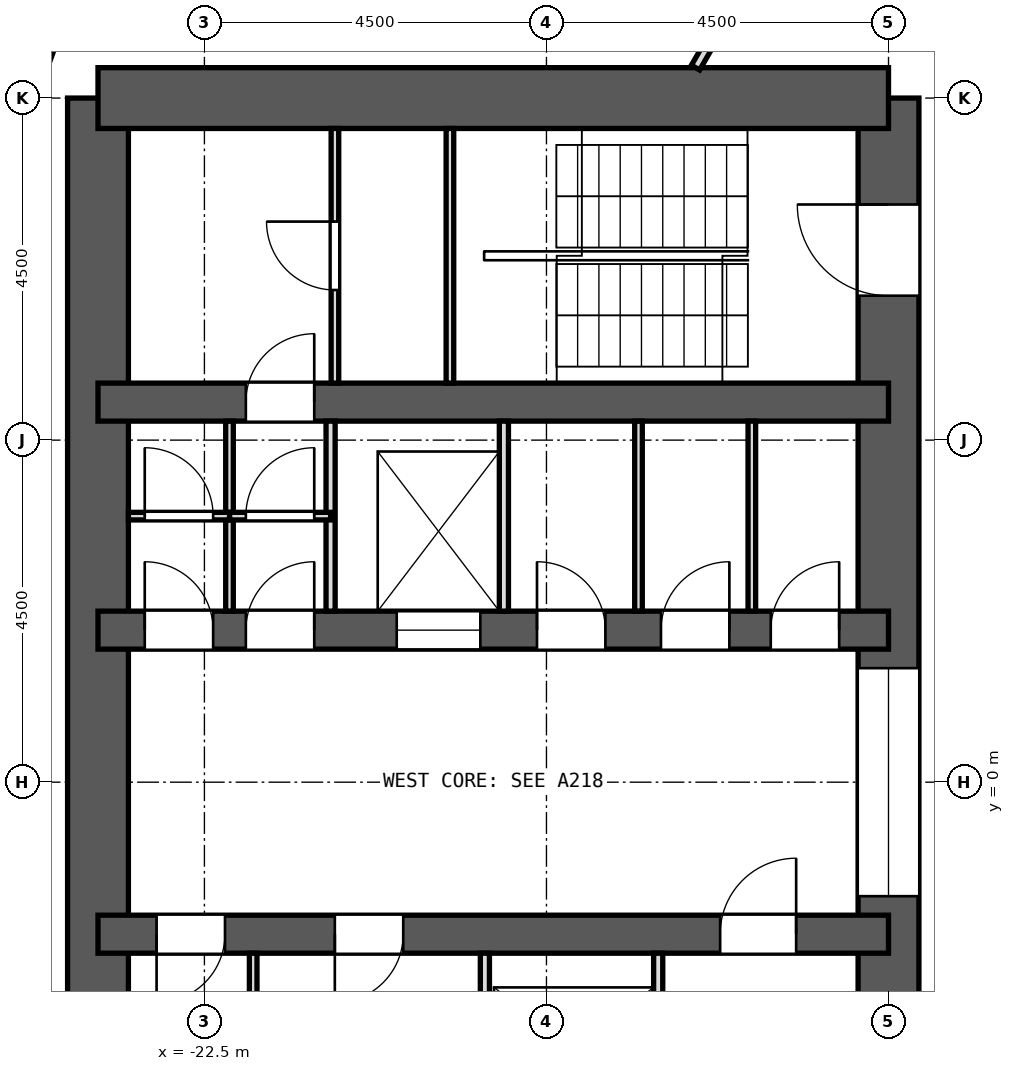
"""IFC4 building model, lengths in metres.
Left out: names, types, materials, properties, quantities, classifications, styles, units other than length and angle.
Written with IfcOpenShell. Run it as: python <this file> out.ifc"""

import sys

from ifc_helpers import new_model, si_unit, direction, frame, frame_2d, origin, place, context, subcontext, project, spatial, rectangle, extrude, element, fill, save


model = new_model("IFC4")
c1 = context("Model", 3, precision=1e-05, world=origin(), true_north=direction((0.0, 1.0)))
c2 = subcontext(c1, "Body", "Model", "MODEL_VIEW")
j1 = project(units=[si_unit("LENGTHUNIT", "METRE"), si_unit("PLANEANGLEUNIT", "RADIAN")], contexts=[c1])
p1 = place(None, origin())
s1 = spatial("IfcSite", under=j1, at=p1, CompositionType="ELEMENT")
p2 = place(p1, origin())
s2 = spatial("IfcBuilding", under=s1, at=p2, CompositionType="ELEMENT")
p3 = place(p2, frame((0.0, 0.0, 101.8)))
s3 = spatial("IfcBuildingStorey", under=s2, at=p3, CompositionType="ELEMENT", Elevation=101.8)
p4 = place(p3, frame((-13.5, -9.0, 0.0), z_axis=(0.0, 0.0, 1.0), x_axis=(0.0, 1.0, 0.0)))
e1 = element("IfcWall", 1, at=p4, inside=s3, PredefinedType="SHEAR", context=c2, shape_type="SweptSolid", body=[
    extrude(rectangle(XDim=18.0, YDim=0.8, at=frame_2d((9.0, 0.0))), origin(), (0.0, 0.0, 1.0), 3.3),
])
p5 = place(p4, frame((15.4, 0.0, 0.0)))
e2 = element("IfcOpeningElement", 2, at=p5, cuts=e1, PredefinedType="OPENING", context=c2, shape_type="SweptSolid", body=[
    extrude(rectangle(XDim=1.2, YDim=2.1, at=frame_2d((0.6, 1.05))), frame((0.0, 0.412, 0.0), z_axis=(0.0, -1.0, 0.0), x_axis=(1.0, 0.0, 0.0)), (0.0, 0.0, 1.0), 0.824),
])
p6 = place(p4, frame((1.4, 0.0, 0.0)))
e3 = element("IfcOpeningElement", 3, at=p6, cuts=e1, PredefinedType="OPENING", context=c2, shape_type="SweptSolid", body=[
    extrude(rectangle(XDim=1.2, YDim=2.1, at=frame_2d((0.6, 1.05))), frame((0.0, 0.412, 0.0), z_axis=(0.0, -1.0, 0.0), x_axis=(1.0, 0.0, 0.0)), (0.0, 0.0, 1.0), 0.824),
])
p7 = place(p4, frame((7.5, 0.0, 0.0)))
e4 = element("IfcOpeningElement", 4, at=p7, cuts=e1, PredefinedType="OPENING", context=c2, shape_type="SweptSolid", body=[
    extrude(rectangle(XDim=3.0, YDim=2.4, at=frame_2d((1.5, 1.2))), frame((0.0, 0.412, 0.0), z_axis=(0.0, -1.0, 0.0), x_axis=(1.0, 0.0, 0.0)), (0.0, 0.0, 1.0), 0.824),
])
p8 = place(p3, frame((-23.9, -9.0, 0.0), z_axis=(0.0, 0.0, 1.0), x_axis=(0.0, 1.0, 0.0)))
e5 = element("IfcWall", 5, at=p8, inside=s3, PredefinedType="SHEAR", context=c2, shape_type="SweptSolid", body=[
    extrude(rectangle(XDim=18.0, YDim=0.8, at=frame_2d((9.0, 0.0))), origin(), (0.0, 0.0, 1.0), 3.3),
])
p9 = place(p3, frame((-13.5, 9.0, 0.0), z_axis=(0.0, 0.0, 1.0), x_axis=(-1.0, 0.0, 0.0)))
e6 = element("IfcWall", 6, at=p9, inside=s3, PredefinedType="SHEAR", context=c2, shape_type="SweptSolid", body=[
    extrude(rectangle(XDim=10.4, YDim=0.8, at=frame_2d((5.2, 0.0))), origin(), (0.0, 0.0, 1.0), 3.3),
])
p10 = place(p3, frame((-13.5, 5.0, 0.0), z_axis=(0.0, 0.0, 1.0), x_axis=(-1.0, 0.0, 0.0)))
e7 = element("IfcWall", 7, at=p10, inside=s3, PredefinedType="SHEAR", context=c2, shape_type="SweptSolid", body=[
    extrude(rectangle(XDim=10.4, YDim=0.5, at=frame_2d((5.2, 0.0))), origin(), (0.0, 0.0, 1.0), 3.3),
])
p11 = place(p10, frame((7.555, 0.0, 0.0)))
e8 = element("IfcOpeningElement", 8, at=p11, cuts=e7, PredefinedType="OPENING", context=c2, shape_type="SweptSolid", body=[
    extrude(rectangle(XDim=0.9, YDim=2.1, at=frame_2d((0.45, 1.05))), frame((0.0, 0.262, 0.0), z_axis=(0.0, -1.0, 0.0), x_axis=(1.0, 0.0, 0.0)), (0.0, 0.0, 1.0), 0.524),
])
p12 = place(p3, frame((-13.5, 2.0, 0.0), z_axis=(0.0, 0.0, 1.0), x_axis=(-1.0, 0.0, 0.0)))
e9 = element("IfcWall", 9, at=p12, inside=s3, PredefinedType="SHEAR", context=c2, shape_type="SweptSolid", body=[
    extrude(rectangle(XDim=10.4, YDim=0.5, at=frame_2d((5.2, 0.0))), origin(), (0.0, 0.0, 1.0), 3.3),
])
p13 = place(p12, frame((5.37, 0.0, 0.0)))
e10 = element("IfcOpeningElement", 10, at=p13, cuts=e9, PredefinedType="OPENING", context=c2, shape_type="SweptSolid", body=[
    extrude(rectangle(XDim=1.1, YDim=2.1, at=frame_2d((0.55, 1.05))), frame((0.0, 0.262, 0.0), z_axis=(0.0, -1.0, 0.0), x_axis=(1.0, 0.0, 0.0)), (0.0, 0.0, 1.0), 0.524),
])
p14 = place(p12, frame((0.649, 0.0, 0.0)))
e11 = element("IfcOpeningElement", 11, at=p14, cuts=e9, PredefinedType="OPENING", context=c2, shape_type="SweptSolid", body=[
    extrude(rectangle(XDim=0.9, YDim=2.1, at=frame_2d((0.45, 1.05))), frame((0.0, 0.262, 0.0), z_axis=(0.0, -1.0, 0.0), x_axis=(1.0, 0.0, 0.0)), (0.0, 0.0, 1.0), 0.524),
])
p15 = place(p12, frame((2.094, 0.0, 0.0)))
e12 = element("IfcOpeningElement", 12, at=p15, cuts=e9, PredefinedType="OPENING", context=c2, shape_type="SweptSolid", body=[
    extrude(rectangle(XDim=0.9, YDim=2.1, at=frame_2d((0.45, 1.05))), frame((0.0, 0.262, 0.0), z_axis=(0.0, -1.0, 0.0), x_axis=(1.0, 0.0, 0.0)), (0.0, 0.0, 1.0), 0.524),
])
p16 = place(p12, frame((3.725, 0.0, 0.0)))
e13 = element("IfcOpeningElement", 13, at=p16, cuts=e9, PredefinedType="OPENING", context=c2, shape_type="SweptSolid", body=[
    extrude(rectangle(XDim=0.9, YDim=2.1, at=frame_2d((0.45, 1.05))), frame((0.0, 0.262, 0.0), z_axis=(0.0, -1.0, 0.0), x_axis=(1.0, 0.0, 0.0)), (0.0, 0.0, 1.0), 0.524),
])
p17 = place(p12, frame((7.555, 0.0, 0.0)))
e14 = element("IfcOpeningElement", 14, at=p17, cuts=e9, PredefinedType="OPENING", context=c2, shape_type="SweptSolid", body=[
    extrude(rectangle(XDim=0.9, YDim=2.1, at=frame_2d((0.45, 1.05))), frame((0.0, 0.262, 0.0), z_axis=(0.0, -1.0, 0.0), x_axis=(1.0, 0.0, 0.0)), (0.0, 0.0, 1.0), 0.524),
])
p18 = place(p12, frame((8.885, 0.0, 0.0)))
e15 = element("IfcOpeningElement", 15, at=p18, cuts=e9, PredefinedType="OPENING", context=c2, shape_type="SweptSolid", body=[
    extrude(rectangle(XDim=0.9, YDim=2.1, at=frame_2d((0.45, 1.05))), frame((0.0, 0.262, 0.0), z_axis=(0.0, -1.0, 0.0), x_axis=(1.0, 0.0, 0.0)), (0.0, 0.0, 1.0), 0.524),
])
p19 = place(p3, frame((-13.5, -2.0, 0.0), z_axis=(0.0, 0.0, 1.0), x_axis=(-1.0, 0.0, 0.0)))
e16 = element("IfcWall", 16, at=p19, inside=s3, PredefinedType="SHEAR", context=c2, shape_type="SweptSolid", body=[
    extrude(rectangle(XDim=10.4, YDim=0.5, at=frame_2d((5.2, 0.0))), origin(), (0.0, 0.0, 1.0), 3.3),
])
p20 = place(p19, frame((1.215, 0.0, 0.0)))
e17 = element("IfcOpeningElement", 17, at=p20, cuts=e16, PredefinedType="OPENING", context=c2, shape_type="SweptSolid", body=[
    extrude(rectangle(XDim=1.0, YDim=2.1, at=frame_2d((0.5, 1.05))), frame((0.0, 0.262, 0.0), z_axis=(0.0, -1.0, 0.0), x_axis=(1.0, 0.0, 0.0)), (0.0, 0.0, 1.0), 0.524),
])
p21 = place(p19, frame((6.384, 0.0, 0.0)))
e18 = element("IfcOpeningElement", 18, at=p21, cuts=e16, PredefinedType="OPENING", context=c2, shape_type="SweptSolid", body=[
    extrude(rectangle(XDim=0.9, YDim=2.1, at=frame_2d((0.45, 1.05))), frame((0.0, 0.262, 0.0), z_axis=(0.0, -1.0, 0.0), x_axis=(1.0, 0.0, 0.0)), (0.0, 0.0, 1.0), 0.524),
])
p22 = place(p19, frame((8.729, 0.0, 0.0)))
e19 = element("IfcOpeningElement", 19, at=p22, cuts=e16, PredefinedType="OPENING", context=c2, shape_type="SweptSolid", body=[
    extrude(rectangle(XDim=0.9, YDim=2.1, at=frame_2d((0.45, 1.05))), frame((0.0, 0.262, 0.0), z_axis=(0.0, -1.0, 0.0), x_axis=(1.0, 0.0, 0.0)), (0.0, 0.0, 1.0), 0.524),
])
p23 = place(p3, frame((-24.369, 10.811, 0.0), z_axis=(0.0, 0.0, 1.0), x_axis=(-0.341990236633, -0.939703505393, 0.0)))
e20 = element("IfcWall", 20, at=p23, inside=s3, PredefinedType="SOLIDWALL", context=c2, shape_type="SweptSolid", body=[
    extrude(rectangle(XDim=3.648, YDim=0.6, at=frame_2d((1.824, 0.0))), origin(), (0.0, 0.0, 1.0), 2.8),
])
p24 = place(p3, frame((-13.101, 13.099, 0.0), z_axis=(0.0, 0.0, 1.0), x_axis=(0.707106781187, -0.707106781187, 0.0)))
e21 = element("IfcWall", 21, at=p24, inside=s3, PredefinedType="PARTITIONING", context=c2, shape_type="SweptSolid", body=[
    extrude(rectangle(XDim=5.203, YDim=0.125, at=frame_2d((2.602, 0.0))), origin(), (0.0, 0.0, 1.0), 2.8),
])
p25 = place(p3, frame((-16.039, 9.401, 0.0), z_axis=(0.0, 0.0, 1.0), x_axis=(0.499950205064, 0.866054150996, 0.0)))
e22 = element("IfcWall", 22, at=p25, inside=s3, PredefinedType="PARTITIONING", context=c2, shape_type="SweptSolid", body=[
    extrude(rectangle(XDim=1.454, YDim=0.125, at=frame_2d((0.727, 0.0))), origin(), (0.0, 0.0, 1.0), 2.8),
])
for number, where, z_axis, x_axis in (
    (23, (-15.298, 2.25, 0.0), (0.0, 0.0, 1.0), (0.0, 1.0, 0.0)),
    (24, (-16.789, 2.25, 0.0), (0.0, 0.0, 1.0), (0.0, 1.0, 0.0)),
):
    element("IfcWall", number, at=place(p3, frame(where, z_axis=z_axis, x_axis=x_axis)), inside=s3, PredefinedType="PARTITIONING", context=c2, shape_type="SweptSolid", body=[
        extrude(rectangle(XDim=2.5, YDim=0.1, at=frame_2d((1.25, 0.0))), origin(), (0.0, 0.0, 1.0), 2.8),
    ])
for number, where, z_axis, x_axis in (
    (25, (-18.56, 2.25, 0.0), (0.0, 0.0, 1.0), (0.0, 1.0, 0.0)),
    (26, (-20.84, 2.25, 0.0), (0.0, 0.0, 1.0), (0.0, 1.0, 0.0)),
):
    element("IfcWall", number, at=place(p3, frame(where, z_axis=z_axis, x_axis=x_axis)), inside=s3, PredefinedType="PARTITIONING", context=c2, shape_type="SweptSolid", body=[
        extrude(rectangle(XDim=2.5, YDim=0.12, at=frame_2d((1.25, 0.0))), origin(), (0.0, 0.0, 1.0), 2.8),
    ])
p26 = place(p3, frame((-22.17, 2.25, 0.0), z_axis=(0.0, 0.0, 1.0), x_axis=(0.0, 1.0, 0.0)))
e27 = element("IfcWall", 27, at=p26, inside=s3, PredefinedType="PARTITIONING", context=c2, shape_type="SweptSolid", body=[
    extrude(rectangle(XDim=2.5, YDim=0.1, at=frame_2d((1.25, 0.0))), origin(), (0.0, 0.0, 1.0), 2.8),
])
p27 = place(p3, frame((-16.53, -4.75, 0.0), z_axis=(0.0, 0.0, 1.0), x_axis=(0.0, 1.0, 0.0)))
e28 = element("IfcWall", 28, at=p27, inside=s3, PredefinedType="PARTITIONING", context=c2, shape_type="SweptSolid", body=[
    extrude(rectangle(XDim=2.5, YDim=0.12, at=frame_2d((1.25, 0.0))), origin(), (0.0, 0.0, 1.0), 2.8),
])
p28 = place(p27, frame((0.7, 0.0, 0.0)))
e29 = element("IfcOpeningElement", 29, at=p28, cuts=e28, PredefinedType="OPENING", context=c2, shape_type="SweptSolid", body=[
    extrude(rectangle(XDim=1.1, YDim=2.1, at=frame_2d((0.55, 1.05))), frame((0.0, 0.072, 0.0), z_axis=(0.0, -1.0, 0.0), x_axis=(1.0, 0.0, 0.0)), (0.0, 0.0, 1.0), 0.144),
])
p29 = place(p3, frame((-18.81, -4.75, 0.0), z_axis=(0.0, 0.0, 1.0), x_axis=(0.0, 1.0, 0.0)))
e30 = element("IfcWall", 30, at=p29, inside=s3, PredefinedType="PARTITIONING", context=c2, shape_type="SweptSolid", body=[
    extrude(rectangle(XDim=2.5, YDim=0.12, at=frame_2d((1.25, 0.0))), origin(), (0.0, 0.0, 1.0), 2.8),
])
p30 = place(p3, frame((-21.858, -4.75, 0.0), z_axis=(0.0, 0.0, 1.0), x_axis=(0.0, 1.0, 0.0)))
e31 = element("IfcWall", 31, at=p30, inside=s3, PredefinedType="PARTITIONING", context=c2, shape_type="SweptSolid", body=[
    extrude(rectangle(XDim=2.5, YDim=0.1, at=frame_2d((1.25, 0.0))), origin(), (0.0, 0.0, 1.0), 2.8),
])
p31 = place(p3, frame((-20.84, 3.5, 0.0), z_axis=(0.0, 0.0, 1.0), x_axis=(-1.0, 0.0, 0.0)))
e32 = element("IfcWall", 32, at=p31, inside=s3, PredefinedType="PARTITIONING", context=c2, shape_type="SweptSolid", body=[
    extrude(rectangle(XDim=1.33, YDim=0.1, at=frame_2d((0.665, 0.0))), origin(), (0.0, 0.0, 1.0), 2.8),
])
p32 = place(p31, frame((0.215, 0.0, 0.0)))
e33 = element("IfcOpeningElement", 33, at=p32, cuts=e32, PredefinedType="OPENING", context=c2, shape_type="SweptSolid", body=[
    extrude(rectangle(XDim=0.9, YDim=2.1, at=frame_2d((0.45, 1.05))), frame((0.0, 0.062, 0.0), z_axis=(0.0, -1.0, 0.0), x_axis=(1.0, 0.0, 0.0)), (0.0, 0.0, 1.0), 0.124),
])
p33 = place(p3, frame((-22.17, 3.5, 0.0), z_axis=(0.0, 0.0, 1.0), x_axis=(-1.0, 0.0, 0.0)))
e34 = element("IfcWall", 34, at=p33, inside=s3, PredefinedType="PARTITIONING", context=c2, shape_type="SweptSolid", body=[
    extrude(rectangle(XDim=1.33, YDim=0.1, at=frame_2d((0.665, 0.0))), origin(), (0.0, 0.0, 1.0), 2.8),
])
p34 = place(p33, frame((0.215, 0.0, 0.0)))
e35 = element("IfcOpeningElement", 35, at=p34, cuts=e34, PredefinedType="OPENING", context=c2, shape_type="SweptSolid", body=[
    extrude(rectangle(XDim=0.9, YDim=2.1, at=frame_2d((0.45, 1.05))), frame((0.0, 0.062, 0.0), z_axis=(0.0, -1.0, 0.0), x_axis=(1.0, 0.0, 0.0)), (0.0, 0.0, 1.0), 0.124),
])
p35 = place(p3, frame((-19.27, 5.25, 0.0), z_axis=(0.0, 0.0, 1.0), x_axis=(0.0, 1.0, 0.0)))
e36 = element("IfcWall", 36, at=p35, inside=s3, PredefinedType="PARTITIONING", context=c2, shape_type="SweptSolid", body=[
    extrude(rectangle(XDim=3.35, YDim=0.1, at=frame_2d((1.675, 0.0))), origin(), (0.0, 0.0, 1.0), 2.8),
])
p36 = place(p3, frame((-20.783, 5.25, 0.0), z_axis=(0.0, 0.0, 1.0), x_axis=(0.0, 1.0, 0.0)))
e37 = element("IfcWall", 37, at=p36, inside=s3, PredefinedType="PARTITIONING", context=c2, shape_type="SweptSolid", body=[
    extrude(rectangle(XDim=3.35, YDim=0.1, at=frame_2d((1.675, 0.0))), origin(), (0.0, 0.0, 1.0), 2.8),
])
p37 = place(p36, frame((1.225, 0.0, 0.0)))
e38 = element("IfcOpeningElement", 38, at=p37, cuts=e37, PredefinedType="OPENING", context=c2, shape_type="SweptSolid", body=[
    extrude(rectangle(XDim=0.9, YDim=2.1, at=frame_2d((0.45, 1.05))), frame((0.0, 0.062, 0.0), z_axis=(0.0, -1.0, 0.0), x_axis=(1.0, 0.0, 0.0)), (0.0, 0.0, 1.0), 0.124),
])
p38 = place(p13, origin())
e39 = element("IfcDoor", 39, at=p38, inside=s3, OperationType="DOUBLE_DOOR_SLIDING", PredefinedType="DOOR", context=c2, shape_type="SweptSolid", body=[
    extrude(rectangle(XDim=1.1, YDim=2.1, at=frame_2d((0.55, 1.05))), frame((0.0, 0.025, 0.0), z_axis=(0.0, -1.0, 0.0), x_axis=(1.0, 0.0, 0.0)), (0.0, 0.0, 1.0), 0.05),
])
fill(e10, e39)
p39 = place(p14, frame((0.9, 0.0, 0.0), z_axis=(0.0, 0.0, 1.0), x_axis=(-1.0, 0.0, 0.0)))
e40 = element("IfcDoor", 40, at=p39, inside=s3, OperationType="SINGLE_SWING_RIGHT", PredefinedType="DOOR", context=c2, shape_type="SweptSolid", body=[
    extrude(rectangle(XDim=0.9, YDim=2.1, at=frame_2d((0.45, 1.05))), frame((0.0, 0.025, 0.0), z_axis=(0.0, -1.0, 0.0), x_axis=(1.0, 0.0, 0.0)), (0.0, 0.0, 1.0), 0.05),
])
fill(e11, e40)
p40 = place(p15, frame((0.9, 0.0, 0.0), z_axis=(0.0, 0.0, 1.0), x_axis=(-1.0, 0.0, 0.0)))
e41 = element("IfcDoor", 41, at=p40, inside=s3, OperationType="SINGLE_SWING_RIGHT", PredefinedType="DOOR", context=c2, shape_type="SweptSolid", body=[
    extrude(rectangle(XDim=0.9, YDim=2.1, at=frame_2d((0.45, 1.05))), frame((0.0, 0.025, 0.0), z_axis=(0.0, -1.0, 0.0), x_axis=(1.0, 0.0, 0.0)), (0.0, 0.0, 1.0), 0.05),
])
fill(e12, e41)
p41 = place(p16, frame((0.9, 0.0, 0.0), z_axis=(0.0, 0.0, 1.0), x_axis=(-1.0, 0.0, 0.0)))
e42 = element("IfcDoor", 42, at=p41, inside=s3, OperationType="SINGLE_SWING_LEFT", PredefinedType="DOOR", context=c2, shape_type="SweptSolid", body=[
    extrude(rectangle(XDim=0.9, YDim=2.1, at=frame_2d((0.45, 1.05))), frame((0.0, 0.025, 0.0), z_axis=(0.0, -1.0, 0.0), x_axis=(1.0, 0.0, 0.0)), (0.0, 0.0, 1.0), 0.05),
])
fill(e13, e42)
p42 = place(p17, frame((0.9, 0.0, 0.0), z_axis=(0.0, 0.0, 1.0), x_axis=(-1.0, 0.0, 0.0)))
e43 = element("IfcDoor", 43, at=p42, inside=s3, OperationType="SINGLE_SWING_RIGHT", PredefinedType="DOOR", context=c2, shape_type="SweptSolid", body=[
    extrude(rectangle(XDim=0.9, YDim=2.1, at=frame_2d((0.45, 1.05))), frame((0.0, 0.025, 0.0), z_axis=(0.0, -1.0, 0.0), x_axis=(1.0, 0.0, 0.0)), (0.0, 0.0, 1.0), 0.05),
])
fill(e14, e43)
p43 = place(p18, frame((0.9, 0.0, 0.0), z_axis=(0.0, 0.0, 1.0), x_axis=(-1.0, 0.0, 0.0)))
e44 = element("IfcDoor", 44, at=p43, inside=s3, OperationType="SINGLE_SWING_LEFT", PredefinedType="DOOR", context=c2, shape_type="SweptSolid", body=[
    extrude(rectangle(XDim=0.9, YDim=2.1, at=frame_2d((0.45, 1.05))), frame((0.0, 0.025, 0.0), z_axis=(0.0, -1.0, 0.0), x_axis=(1.0, 0.0, 0.0)), (0.0, 0.0, 1.0), 0.05),
])
fill(e15, e44)
p44 = place(p20, frame((1.0, 0.0, 0.0), z_axis=(0.0, 0.0, 1.0), x_axis=(-1.0, 0.0, 0.0)))
e45 = element("IfcDoor", 45, at=p44, inside=s3, OperationType="SINGLE_SWING_RIGHT", PredefinedType="DOOR", context=c2, shape_type="SweptSolid", body=[
    extrude(rectangle(XDim=1.0, YDim=2.1, at=frame_2d((0.5, 1.05))), frame((0.0, 0.025, 0.0), z_axis=(0.0, -1.0, 0.0), x_axis=(1.0, 0.0, 0.0)), (0.0, 0.0, 1.0), 0.05),
])
fill(e17, e45)
p45 = place(p21, origin())
e46 = element("IfcDoor", 46, at=p45, inside=s3, OperationType="SINGLE_SWING_RIGHT", PredefinedType="DOOR", context=c2, shape_type="SweptSolid", body=[
    extrude(rectangle(XDim=0.9, YDim=2.1, at=frame_2d((0.45, 1.05))), frame((0.0, 0.025, 0.0), z_axis=(0.0, -1.0, 0.0), x_axis=(1.0, 0.0, 0.0)), (0.0, 0.0, 1.0), 0.05),
])
fill(e18, e46)
p46 = place(p22, origin())
e47 = element("IfcDoor", 47, at=p46, inside=s3, OperationType="SINGLE_SWING_RIGHT", PredefinedType="DOOR", context=c2, shape_type="SweptSolid", body=[
    extrude(rectangle(XDim=0.9, YDim=2.1, at=frame_2d((0.45, 1.05))), frame((0.0, 0.025, 0.0), z_axis=(0.0, -1.0, 0.0), x_axis=(1.0, 0.0, 0.0)), (0.0, 0.0, 1.0), 0.05),
])
fill(e19, e47)
p47 = place(p34, frame((0.9, 0.0, 0.0), z_axis=(0.0, 0.0, 1.0), x_axis=(-1.0, 0.0, 0.0)))
e48 = element("IfcDoor", 48, at=p47, inside=s3, OperationType="SINGLE_SWING_LEFT", PredefinedType="DOOR", context=c2, shape_type="SweptSolid", body=[
    extrude(rectangle(XDim=0.9, YDim=2.1, at=frame_2d((0.45, 1.05))), frame((0.0, 0.025, 0.0), z_axis=(0.0, -1.0, 0.0), x_axis=(1.0, 0.0, 0.0)), (0.0, 0.0, 1.0), 0.05),
])
fill(e35, e48)
p48 = place(p32, frame((0.9, 0.0, 0.0), z_axis=(0.0, 0.0, 1.0), x_axis=(-1.0, 0.0, 0.0)))
e49 = element("IfcDoor", 49, at=p48, inside=s3, OperationType="SINGLE_SWING_RIGHT", PredefinedType="DOOR", context=c2, shape_type="SweptSolid", body=[
    extrude(rectangle(XDim=0.9, YDim=2.1, at=frame_2d((0.45, 1.05))), frame((0.0, 0.025, 0.0), z_axis=(0.0, -1.0, 0.0), x_axis=(1.0, 0.0, 0.0)), (0.0, 0.0, 1.0), 0.05),
])
fill(e33, e49)
p49 = place(p37, origin())
e50 = element("IfcDoor", 50, at=p49, inside=s3, OperationType="SINGLE_SWING_RIGHT", PredefinedType="DOOR", context=c2, shape_type="SweptSolid", body=[
    extrude(rectangle(XDim=0.9, YDim=2.1, at=frame_2d((0.45, 1.05))), frame((0.0, 0.025, 0.0), z_axis=(0.0, -1.0, 0.0), x_axis=(1.0, 0.0, 0.0)), (0.0, 0.0, 1.0), 0.05),
])
fill(e38, e50)
p50 = place(p11, frame((0.9, 0.0, 0.0), z_axis=(0.0, 0.0, 1.0), x_axis=(-1.0, 0.0, 0.0)))
e51 = element("IfcDoor", 51, at=p50, inside=s3, OperationType="SINGLE_SWING_RIGHT", PredefinedType="DOOR", context=c2, shape_type="SweptSolid", body=[
    extrude(rectangle(XDim=0.9, YDim=2.1, at=frame_2d((0.45, 1.05))), frame((0.0, 0.025, 0.0), z_axis=(0.0, -1.0, 0.0), x_axis=(1.0, 0.0, 0.0)), (0.0, 0.0, 1.0), 0.05),
])
fill(e8, e51)
p51 = place(p5, origin())
e52 = element("IfcDoor", 52, at=p51, inside=s3, OperationType="SINGLE_SWING_RIGHT", PredefinedType="DOOR", context=c2, shape_type="SweptSolid", body=[
    extrude(rectangle(XDim=1.2, YDim=2.1, at=frame_2d((0.6, 1.05))), frame((0.0, 0.025, 0.0), z_axis=(0.0, -1.0, 0.0), x_axis=(1.0, 0.0, 0.0)), (0.0, 0.0, 1.0), 0.05),
])
fill(e2, e52)
p52 = place(p7, origin())
e53 = element("IfcDoor", 53, at=p52, inside=s3, OperationType="DOUBLE_DOOR_SLIDING", PredefinedType="DOOR", context=c2, shape_type="SweptSolid", body=[
    extrude(rectangle(XDim=3.0, YDim=2.4, at=frame_2d((1.5, 1.2))), frame((0.0, 0.025, 0.0), z_axis=(0.0, -1.0, 0.0), x_axis=(1.0, 0.0, 0.0)), (0.0, 0.0, 1.0), 0.05),
])
fill(e4, e53)
save(model, sys.argv[1])
